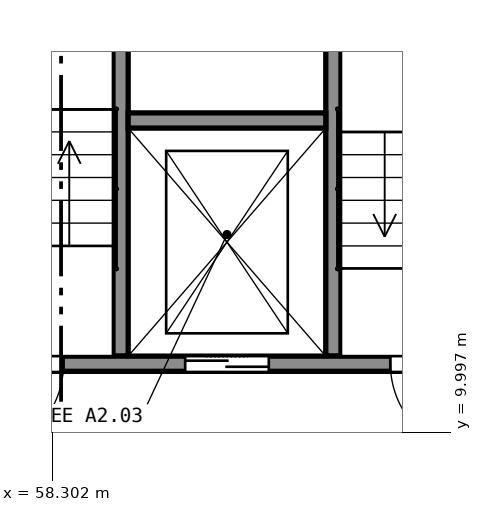
"""IFC4 building model, lengths in metres.
Left out: names, types, materials, properties, quantities, classifications, styles, units other than length and angle.
Written with IfcOpenShell. Run it as: python <this file> out.ifc"""

import sys

from ifc_helpers import new_model, si_unit, direction, frame, frame_2d, origin, place, context, subcontext, project, spatial, rectangle, extrude, element, fill, save


model = new_model("IFC4")
c1 = context("Model", 3, precision=1e-05, world=origin(), true_north=direction((0.0, 1.0)))
c2 = subcontext(c1, "Body", "Model", "MODEL_VIEW")
j1 = project(units=[si_unit("LENGTHUNIT", "METRE"), si_unit("PLANEANGLEUNIT", "RADIAN")], contexts=[c1])
p1 = place(None, origin())
s1 = spatial("IfcSite", under=j1, at=p1, CompositionType="ELEMENT")
p2 = place(p1, origin())
s2 = spatial("IfcBuilding", under=s1, at=p2, CompositionType="ELEMENT")
p3 = place(p2, origin())
s3 = spatial("IfcBuildingStorey", under=s2, at=p3, CompositionType="ELEMENT", Elevation=0.0)
p4 = place(p3, frame((56.6, 10.9, -1.8), z_axis=(0.0, 0.0, 1.0), x_axis=(1.0, 0.0, 0.0)))
e1 = element("IfcWall", 1, at=p4, inside=s3, PredefinedType="SHEAR", context=c2, shape_type="SweptSolid", body=[
    extrude(rectangle(XDim=8.0, YDim=0.2, at=frame_2d((4.0, 0.0))), origin(), (0.0, 0.0, 1.0), 7.3),
])
p5 = place(p4, frame((0.65, 0.0, 1.8)))
e2 = element("IfcOpeningElement", 2, at=p5, cuts=e1, PredefinedType="OPENING", context=c2, shape_type="SweptSolid", body=[
    extrude(rectangle(XDim=1.2, YDim=2.1, at=frame_2d((0.6, 1.05))), frame((0.0, 0.11, 0.0), z_axis=(0.0, -1.0, 0.0), x_axis=(1.0, 0.0, 0.0)), (0.0, 0.0, 1.0), 0.22),
])
p6 = place(p4, frame((6.15, 0.0, 1.8)))
e3 = element("IfcOpeningElement", 3, at=p6, cuts=e1, PredefinedType="OPENING", context=c2, shape_type="SweptSolid", body=[
    extrude(rectangle(XDim=1.2, YDim=2.1, at=frame_2d((0.6, 1.05))), frame((0.0, 0.11, 0.0), z_axis=(0.0, -1.0, 0.0), x_axis=(1.0, 0.0, 0.0)), (0.0, 0.0, 1.0), 0.22),
])
p7 = place(p4, frame((3.45, 0.0, 1.8)))
e4 = element("IfcOpeningElement", 4, at=p7, cuts=e1, PredefinedType="OPENING", context=c2, shape_type="SweptSolid", body=[
    extrude(rectangle(XDim=1.1, YDim=2.1, at=frame_2d((0.55, 1.05))), frame((0.0, 0.11, 0.0), z_axis=(0.0, -1.0, 0.0), x_axis=(1.0, 0.0, 0.0)), (0.0, 0.0, 1.0), 0.22),
])
for number, where, z_axis, x_axis in (
    (5, (59.2, 11.0, -1.8), (0.0, 0.0, 1.0), (0.0, 1.0, 0.0)),
    (6, (62.0, 11.0, -1.8), (0.0, 0.0, 1.0), (0.0, 1.0, 0.0)),
):
    element("IfcWall", number, at=place(p3, frame(where, z_axis=z_axis, x_axis=x_axis)), inside=s3, PredefinedType="SHEAR", context=c2, shape_type="SweptSolid", body=[
        extrude(rectangle(XDim=5.6, YDim=0.2, at=frame_2d((2.8, 0.0))), origin(), (0.0, 0.0, 1.0), 7.3),
    ])
p8 = place(p3, frame((59.3, 14.1, -1.8), z_axis=(0.0, 0.0, 1.0), x_axis=(1.0, 0.0, 0.0)))
e7 = element("IfcWall", 7, at=p8, inside=s3, PredefinedType="SHEAR", context=c2, shape_type="SweptSolid", body=[
    extrude(rectangle(XDim=2.6, YDim=0.2, at=frame_2d((1.3, 0.0))), origin(), (0.0, 0.0, 1.0), 7.3),
])
p9 = place(p5, origin())
e8 = element("IfcDoor", 8, at=p9, inside=s3, OperationType="SINGLE_SWING_LEFT", PredefinedType="DOOR", context=c2, shape_type="SweptSolid", body=[
    extrude(rectangle(XDim=1.2, YDim=2.1, at=frame_2d((0.6, 1.05))), frame((0.0, 0.025, 0.0), z_axis=(0.0, -1.0, 0.0), x_axis=(1.0, 0.0, 0.0)), (0.0, 0.0, 1.0), 0.05),
])
fill(e2, e8)
p10 = place(p6, origin())
e9 = element("IfcDoor", 9, at=p10, inside=s3, OperationType="SINGLE_SWING_RIGHT", PredefinedType="DOOR", context=c2, shape_type="SweptSolid", body=[
    extrude(rectangle(XDim=1.2, YDim=2.1, at=frame_2d((0.6, 1.05))), frame((0.0, 0.025, 0.0), z_axis=(0.0, -1.0, 0.0), x_axis=(1.0, 0.0, 0.0)), (0.0, 0.0, 1.0), 0.05),
])
fill(e3, e9)
p11 = place(p7, origin())
e10 = element("IfcDoor", 10, at=p11, inside=s3, OperationType="DOUBLE_DOOR_SLIDING", PredefinedType="DOOR", context=c2, shape_type="SweptSolid", body=[
    extrude(rectangle(XDim=1.1, YDim=2.1, at=frame_2d((0.55, 1.05))), frame((0.0, 0.025, 0.0), z_axis=(0.0, -1.0, 0.0), x_axis=(1.0, 0.0, 0.0)), (0.0, 0.0, 1.0), 0.05),
])
fill(e4, e10)
save(model, sys.argv[1])
